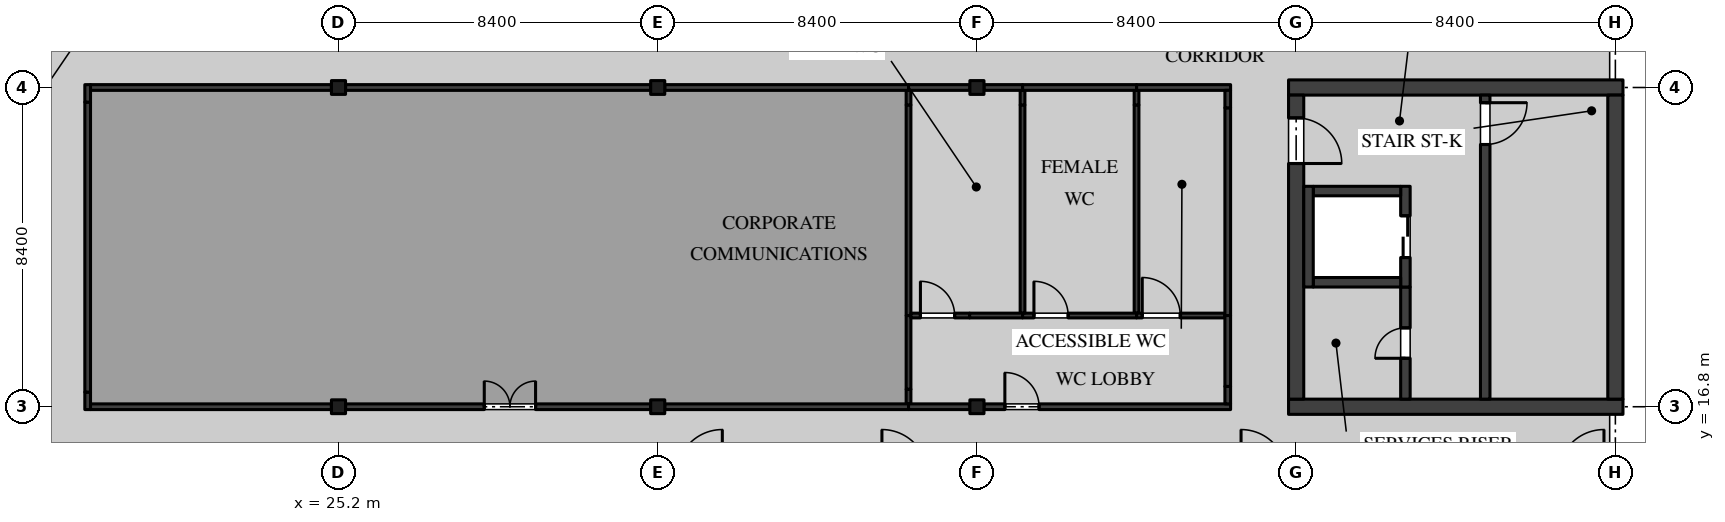
"""IFC4 building model, lengths in metres.
Left out: names, types, materials, properties, quantities, classifications, styles, units other than length and angle.
Written with IfcOpenShell. Run it as: python <this file> out.ifc"""

import sys

from ifc_helpers import new_model, si_unit, direction, frame, frame_2d, origin, origin_2d, place, context, subcontext, project, spatial, rectangle, i_section, extrude, element, fill, save


model = new_model("IFC4")
c1 = context("Model", 3, precision=1e-05, world=origin(), true_north=direction((0.0, 1.0)))
c2 = subcontext(c1, "Body", "Model", "MODEL_VIEW")
j1 = project(units=[si_unit("LENGTHUNIT", "METRE"), si_unit("PLANEANGLEUNIT", "RADIAN")], contexts=[c1])
p1 = place(None, origin())
s1 = spatial("IfcSite", under=j1, at=p1, CompositionType="ELEMENT")
p2 = place(p1, origin())
s2 = spatial("IfcBuilding", under=s1, at=p2, CompositionType="ELEMENT")
p3 = place(p2, frame((0.0, 0.0, 9.9)))
s3 = spatial("IfcBuildingStorey", under=s2, at=p3, CompositionType="ELEMENT", Elevation=9.9)
for number, where, z_axis, x_axis in (
    (1, (25.2, 16.8, 0.0), (0.0, 0.0, 1.0), (1.0, 0.0, 0.0)),
    (2, (25.2, 25.2, 0.0), (0.0, 0.0, 1.0), (1.0, 0.0, 0.0)),
    (3, (33.6, 16.8, 0.0), (0.0, 0.0, 1.0), (1.0, 0.0, 0.0)),
    (4, (33.6, 25.2, 0.0), (0.0, 0.0, 1.0), (1.0, 0.0, 0.0)),
    (5, (42.0, 16.8, 0.0), (0.0, 0.0, 1.0), (1.0, 0.0, 0.0)),
    (6, (42.0, 25.2, 0.0), (0.0, 0.0, 1.0), (1.0, 0.0, 0.0)),
):
    element("IfcColumn", number, at=place(p3, frame(where, z_axis=z_axis, x_axis=x_axis)), inside=s3, PredefinedType="COLUMN", context=c2, shape_type="SweptSolid", body=[
        extrude(i_section(OverallWidth=0.371, OverallDepth=0.363, WebThickness=0.013, FlangeThickness=0.022, FilletRadius=0.015, at=origin_2d()), origin(), (0.0, 0.0, 1.0), 4.37),
    ])
for number, where, z_axis, x_axis in (
    (7, (50.2, 16.8, 0.0), (0.0, 0.0, 1.0), (1.0, 0.0, 0.0)),
    (8, (50.2, 25.2, 0.0), (0.0, 0.0, 1.0), (1.0, 0.0, 0.0)),
):
    element("IfcWall", number, at=place(p3, frame(where, z_axis=z_axis, x_axis=x_axis)), inside=s3, PredefinedType="SHEAR", context=c2, shape_type="SweptSolid", body=[
        extrude(rectangle(XDim=8.8, YDim=0.4, at=frame_2d((4.4, 0.0))), origin(), (0.0, 0.0, 1.0), 4.37),
    ])
p4 = place(p3, frame((50.4, 17.0, 0.0), z_axis=(0.0, 0.0, 1.0), x_axis=(0.0, 1.0, 0.0)))
e9 = element("IfcWall", 9, at=p4, inside=s3, PredefinedType="SHEAR", context=c2, shape_type="SweptSolid", body=[
    extrude(rectangle(XDim=8.0, YDim=0.4, at=frame_2d((4.0, 0.0))), origin(), (0.0, 0.0, 1.0), 4.37),
])
p5 = place(p4, frame((6.2, 0.0, 0.0)))
e10 = element("IfcOpeningElement", 10, at=p5, cuts=e9, PredefinedType="OPENING", context=c2, shape_type="SweptSolid", body=[
    extrude(rectangle(XDim=1.2, YDim=2.1, at=frame_2d((0.6, 1.05))), frame((0.0, 0.21, 0.0), z_axis=(0.0, -1.0, 0.0), x_axis=(1.0, 0.0, 0.0)), (0.0, 0.0, 1.0), 0.42),
])
p6 = place(p3, frame((58.8, 17.0, 0.0), z_axis=(0.0, 0.0, 1.0), x_axis=(0.0, 1.0, 0.0)))
e11 = element("IfcWall", 11, at=p6, inside=s3, PredefinedType="SHEAR", context=c2, shape_type="SweptSolid", body=[
    extrude(rectangle(XDim=8.0, YDim=0.4, at=frame_2d((4.0, 0.0))), origin(), (0.0, 0.0, 1.0), 4.37),
])
p7 = place(p3, frame((55.375, 25.0, 0.0), z_axis=(0.0, 0.0, 1.0), x_axis=(0.0, -1.0, 0.0)))
e12 = element("IfcWall", 12, at=p7, inside=s3, PredefinedType="SOLIDWALL", context=c2, shape_type="SweptSolid", body=[
    extrude(rectangle(XDim=8.0, YDim=0.25, at=frame_2d((4.0, 0.0))), origin(), (0.0, 0.0, 1.0), 4.37),
])
p8 = place(p7, frame((0.2, 0.0, 0.0)))
e13 = element("IfcOpeningElement", 13, at=p8, cuts=e12, PredefinedType="OPENING", context=c2, shape_type="SweptSolid", body=[
    extrude(rectangle(XDim=1.1, YDim=2.1, at=frame_2d((0.55, 1.05))), frame((0.0, 0.135, 0.0), z_axis=(0.0, -1.0, 0.0), x_axis=(1.0, 0.0, 0.0)), (0.0, 0.0, 1.0), 0.27),
])
p9 = place(p3, frame((53.275, 19.95, 0.0), z_axis=(0.0, 0.0, 1.0), x_axis=(0.0, -1.0, 0.0)))
e14 = element("IfcWall", 14, at=p9, inside=s3, PredefinedType="SOLIDWALL", context=c2, shape_type="SweptSolid", body=[
    extrude(rectangle(XDim=2.95, YDim=0.25, at=frame_2d((1.475, 0.0))), origin(), (0.0, 0.0, 1.0), 4.37),
])
p10 = place(p9, frame((1.075, 0.0, 0.0)))
e15 = element("IfcOpeningElement", 15, at=p10, cuts=e14, PredefinedType="OPENING", context=c2, shape_type="SweptSolid", body=[
    extrude(rectangle(XDim=0.8, YDim=2.1, at=frame_2d((0.4, 1.05))), frame((0.0, 0.135, 0.0), z_axis=(0.0, -1.0, 0.0), x_axis=(1.0, 0.0, 0.0)), (0.0, 0.0, 1.0), 0.27),
])
p11 = place(p3, frame((53.275, 19.95, 0.0), z_axis=(0.0, 0.0, 1.0), x_axis=(0.0, 1.0, 0.0)))
e16 = element("IfcWall", 16, at=p11, inside=s3, PredefinedType="SOLIDWALL", context=c2, shape_type="SweptSolid", body=[
    extrude(rectangle(XDim=2.65, YDim=0.25, at=frame_2d((1.325, 0.0))), origin(), (0.0, 0.0, 1.0), 4.37),
])
p12 = place(p11, frame((0.775, 0.0, 0.0)))
e17 = element("IfcOpeningElement", 17, at=p12, cuts=e16, PredefinedType="OPENING", context=c2, shape_type="SweptSolid", body=[
    extrude(rectangle(XDim=1.1, YDim=2.1, at=frame_2d((0.55, 1.05))), frame((0.0, 0.135, 0.0), z_axis=(0.0, -1.0, 0.0), x_axis=(1.0, 0.0, 0.0)), (0.0, 0.0, 1.0), 0.27),
])
for number, where, z_axis, x_axis in (
    (18, (50.85, 22.475, 0.0), (0.0, 0.0, 1.0), (1.0, 0.0, 0.0)),
    (19, (50.85, 20.075, 0.0), (0.0, 0.0, 1.0), (1.0, 0.0, 0.0)),
):
    element("IfcWall", number, at=place(p3, frame(where, z_axis=z_axis, x_axis=x_axis)), inside=s3, PredefinedType="SOLIDWALL", context=c2, shape_type="SweptSolid", body=[
        extrude(rectangle(XDim=2.3, YDim=0.25, at=frame_2d((1.15, 0.0))), origin(), (0.0, 0.0, 1.0), 4.37),
    ])
p13 = place(p3, frame((50.725, 19.95, 0.0), z_axis=(0.0, 0.0, 1.0), x_axis=(0.0, 1.0, 0.0)))
e20 = element("IfcWall", 20, at=p13, inside=s3, PredefinedType="SOLIDWALL", context=c2, shape_type="SweptSolid", body=[
    extrude(rectangle(XDim=2.65, YDim=0.25, at=frame_2d((1.325, 0.0))), origin(), (0.0, 0.0, 1.0), 4.37),
])
p14 = place(p3, frame((40.2, 16.875, 0.0), z_axis=(0.0, 0.0, 1.0), x_axis=(0.0, 1.0, 0.0)))
e21 = element("IfcWall", 21, at=p14, inside=s3, PredefinedType="PARTITIONING", context=c2, shape_type="SweptSolid", body=[
    extrude(rectangle(XDim=0.385, YDim=0.125, at=frame_2d((0.192, 0.0))), origin(), (0.0, 0.0, 1.0), 3.746),
])
p15 = place(p3, frame((40.2, 17.26, 0.0), z_axis=(0.0, 0.0, 1.0), x_axis=(0.0, 1.0, 0.0)))
e22 = element("IfcWall", 22, at=p15, inside=s3, PredefinedType="PARTITIONING", context=c2, shape_type="SweptSolid", body=[
    extrude(rectangle(XDim=1.94, YDim=0.125, at=frame_2d((0.97, 0.0))), origin(), (0.0, 0.0, 1.0), 4.37),
])
p16 = place(p3, frame((40.2, 19.2, 0.0), z_axis=(0.0, 0.0, 1.0), x_axis=(0.0, 1.0, 0.0)))
e23 = element("IfcWall", 23, at=p16, inside=s3, PredefinedType="PARTITIONING", context=c2, shape_type="SweptSolid", body=[
    extrude(rectangle(XDim=5.54, YDim=0.125, at=frame_2d((2.77, 0.0))), origin(), (0.0, 0.0, 1.0), 4.37),
])
p17 = place(p3, frame((40.2, 24.74, 0.0), z_axis=(0.0, 0.0, 1.0), x_axis=(0.0, 1.0, 0.0)))
e24 = element("IfcWall", 24, at=p17, inside=s3, PredefinedType="PARTITIONING", context=c2, shape_type="SweptSolid", body=[
    extrude(rectangle(XDim=0.385, YDim=0.125, at=frame_2d((0.192, 0.0))), origin(), (0.0, 0.0, 1.0), 3.746),
])
p18 = place(p3, frame((18.6, 16.725, 0.0), z_axis=(0.0, 0.0, 1.0), x_axis=(0.0, 1.0, 0.0)))
e25 = element("IfcWall", 25, at=p18, inside=s3, PredefinedType="PARTITIONING", context=c2, shape_type="SweptSolid", body=[
    extrude(rectangle(XDim=0.46, YDim=0.15, at=frame_2d((0.23, 0.0))), origin(), (0.0, 0.0, 1.0), 3.746),
])
p19 = place(p3, frame((18.6, 17.185, 0.0), z_axis=(0.0, 0.0, 1.0), x_axis=(0.0, 1.0, 0.0)))
e26 = element("IfcWall", 26, at=p19, inside=s3, PredefinedType="PARTITIONING", context=c2, shape_type="SweptSolid", body=[
    extrude(rectangle(XDim=7.63, YDim=0.15, at=frame_2d((3.815, 0.0))), origin(), (0.0, 0.0, 1.0), 4.37),
])
p20 = place(p3, frame((18.6, 24.815, 0.0), z_axis=(0.0, 0.0, 1.0), x_axis=(0.0, 1.0, 0.0)))
e27 = element("IfcWall", 27, at=p20, inside=s3, PredefinedType="PARTITIONING", context=c2, shape_type="SweptSolid", body=[
    extrude(rectangle(XDim=0.46, YDim=0.15, at=frame_2d((0.23, 0.0))), origin(), (0.0, 0.0, 1.0), 3.746),
])
p21 = place(p3, frame((18.675, 16.8, 0.0), z_axis=(0.0, 0.0, 1.0), x_axis=(1.0, 0.0, 0.0)))
e28 = element("IfcWall", 28, at=p21, inside=s3, PredefinedType="PARTITIONING", context=c2, shape_type="SweptSolid", body=[
    extrude(rectangle(XDim=6.339, YDim=0.15, at=frame_2d((3.169, 0.0))), origin(), (0.0, 0.0, 1.0), 3.746),
])
p22 = place(p3, frame((25.386, 16.8, 0.0), z_axis=(0.0, 0.0, 1.0), x_axis=(1.0, 0.0, 0.0)))
e29 = element("IfcWall", 29, at=p22, inside=s3, PredefinedType="PARTITIONING", context=c2, shape_type="SweptSolid", body=[
    extrude(rectangle(XDim=8.029, YDim=0.15, at=frame_2d((4.015, 0.0))), origin(), (0.0, 0.0, 1.0), 3.746),
])
p23 = place(p22, frame((3.65, 0.0, 0.0)))
e30 = element("IfcOpeningElement", 30, at=p23, cuts=e29, PredefinedType="OPENING", context=c2, shape_type="SweptSolid", body=[
    extrude(rectangle(XDim=1.35, YDim=2.1, at=frame_2d((0.675, 1.05))), frame((0.0, 0.085, 0.0), z_axis=(0.0, -1.0, 0.0), x_axis=(1.0, 0.0, 0.0)), (0.0, 0.0, 1.0), 0.17),
])
p24 = place(p3, frame((33.785, 16.8, 0.0), z_axis=(0.0, 0.0, 1.0), x_axis=(1.0, 0.0, 0.0)))
e31 = element("IfcWall", 31, at=p24, inside=s3, PredefinedType="PARTITIONING", context=c2, shape_type="SweptSolid", body=[
    extrude(rectangle(XDim=6.415, YDim=0.15, at=frame_2d((3.208, 0.0))), origin(), (0.0, 0.0, 1.0), 3.746),
])
p25 = place(p3, frame((18.675, 25.2, 0.0), z_axis=(0.0, 0.0, 1.0), x_axis=(1.0, 0.0, 0.0)))
e32 = element("IfcWall", 32, at=p25, inside=s3, PredefinedType="PARTITIONING", context=c2, shape_type="SweptSolid", body=[
    extrude(rectangle(XDim=6.339, YDim=0.15, at=frame_2d((3.169, 0.0))), origin(), (0.0, 0.0, 1.0), 3.746),
])
p26 = place(p3, frame((25.386, 25.2, 0.0), z_axis=(0.0, 0.0, 1.0), x_axis=(1.0, 0.0, 0.0)))
e33 = element("IfcWall", 33, at=p26, inside=s3, PredefinedType="PARTITIONING", context=c2, shape_type="SweptSolid", body=[
    extrude(rectangle(XDim=8.029, YDim=0.15, at=frame_2d((4.015, 0.0))), origin(), (0.0, 0.0, 1.0), 3.746),
])
p27 = place(p3, frame((33.785, 25.2, 0.0), z_axis=(0.0, 0.0, 1.0), x_axis=(1.0, 0.0, 0.0)))
e34 = element("IfcWall", 34, at=p27, inside=s3, PredefinedType="PARTITIONING", context=c2, shape_type="SweptSolid", body=[
    extrude(rectangle(XDim=6.415, YDim=0.15, at=frame_2d((3.208, 0.0))), origin(), (0.0, 0.0, 1.0), 3.746),
])
p28 = place(p3, frame((46.2, 19.262, 0.0), z_axis=(0.0, 0.0, 1.0), x_axis=(0.0, 1.0, 0.0)))
e35 = element("IfcWall", 35, at=p28, inside=s3, PredefinedType="PARTITIONING", context=c2, shape_type="SweptSolid", body=[
    extrude(rectangle(XDim=5.478, YDim=0.125, at=frame_2d((2.739, 0.0))), origin(), (0.0, 0.0, 1.0), 4.37),
])
p29 = place(p3, frame((46.2, 24.74, 0.0), z_axis=(0.0, 0.0, 1.0), x_axis=(0.0, 1.0, 0.0)))
e36 = element("IfcWall", 36, at=p29, inside=s3, PredefinedType="PARTITIONING", context=c2, shape_type="SweptSolid", body=[
    extrude(rectangle(XDim=0.385, YDim=0.125, at=frame_2d((0.192, 0.0))), origin(), (0.0, 0.0, 1.0), 3.746),
])
p30 = place(p3, frame((46.2, 19.2, 0.0), z_axis=(0.0, 0.0, 1.0), x_axis=(1.0, 0.0, 0.0)))
e37 = element("IfcWall", 37, at=p30, inside=s3, PredefinedType="PARTITIONING", context=c2, shape_type="SweptSolid", body=[
    extrude(rectangle(XDim=2.325, YDim=0.125, at=frame_2d((1.163, 0.0))), origin(), (0.0, 0.0, 1.0), 3.895),
])
p31 = place(p30, frame((0.15, 0.0, 0.0)))
e38 = element("IfcOpeningElement", 38, at=p31, cuts=e37, PredefinedType="OPENING", context=c2, shape_type="SweptSolid", body=[
    extrude(rectangle(XDim=1.0, YDim=2.1, at=frame_2d((0.5, 1.05))), frame((0.0, 0.073, 0.0), z_axis=(0.0, -1.0, 0.0), x_axis=(1.0, 0.0, 0.0)), (0.0, 0.0, 1.0), 0.145),
])
p32 = place(p3, frame((46.2, 25.2, 0.0), z_axis=(0.0, 0.0, 1.0), x_axis=(1.0, 0.0, 0.0)))
e39 = element("IfcWall", 39, at=p32, inside=s3, PredefinedType="PARTITIONING", context=c2, shape_type="SweptSolid", body=[
    extrude(rectangle(XDim=2.475, YDim=0.15, at=frame_2d((1.238, 0.0))), origin(), (0.0, 0.0, 1.0), 3.746),
])
p33 = place(p3, frame((48.6, 19.2, 0.0), z_axis=(0.0, 0.0, 1.0), x_axis=(0.0, 1.0, 0.0)))
e40 = element("IfcWall", 40, at=p33, inside=s3, PredefinedType="PARTITIONING", context=c2, shape_type="SweptSolid", body=[
    extrude(rectangle(XDim=5.465, YDim=0.15, at=frame_2d((2.732, 0.0))), origin(), (0.0, 0.0, 1.0), 4.37),
])
p34 = place(p3, frame((48.6, 24.665, 0.0), z_axis=(0.0, 0.0, 1.0), x_axis=(0.0, 1.0, 0.0)))
e41 = element("IfcWall", 41, at=p34, inside=s3, PredefinedType="PARTITIONING", context=c2, shape_type="SweptSolid", body=[
    extrude(rectangle(XDim=0.46, YDim=0.15, at=frame_2d((0.23, 0.0))), origin(), (0.0, 0.0, 1.0), 3.746),
])
p35 = place(p3, frame((43.2, 19.2, 0.0), z_axis=(0.0, 0.0, 1.0), x_axis=(1.0, 0.0, 0.0)))
e42 = element("IfcWall", 42, at=p35, inside=s3, PredefinedType="PARTITIONING", context=c2, shape_type="SweptSolid", body=[
    extrude(rectangle(XDim=3.0, YDim=0.125, at=frame_2d((1.5, 0.0))), origin(), (0.0, 0.0, 1.0), 3.895),
])
p36 = place(p35, frame((0.3, 0.0, 0.0)))
e43 = element("IfcOpeningElement", 43, at=p36, cuts=e42, PredefinedType="OPENING", context=c2, shape_type="SweptSolid", body=[
    extrude(rectangle(XDim=0.9, YDim=2.1, at=frame_2d((0.45, 1.05))), frame((0.0, 0.073, 0.0), z_axis=(0.0, -1.0, 0.0), x_axis=(1.0, 0.0, 0.0)), (0.0, 0.0, 1.0), 0.145),
])
p37 = place(p3, frame((43.2, 19.262, 0.0), z_axis=(0.0, 0.0, 1.0), x_axis=(0.0, 1.0, 0.0)))
e44 = element("IfcWall", 44, at=p37, inside=s3, PredefinedType="PARTITIONING", context=c2, shape_type="SweptSolid", body=[
    extrude(rectangle(XDim=5.478, YDim=0.125, at=frame_2d((2.739, 0.0))), origin(), (0.0, 0.0, 1.0), 4.37),
])
p38 = place(p3, frame((43.2, 24.74, 0.0), z_axis=(0.0, 0.0, 1.0), x_axis=(0.0, 1.0, 0.0)))
e45 = element("IfcWall", 45, at=p38, inside=s3, PredefinedType="PARTITIONING", context=c2, shape_type="SweptSolid", body=[
    extrude(rectangle(XDim=0.385, YDim=0.125, at=frame_2d((0.192, 0.0))), origin(), (0.0, 0.0, 1.0), 3.746),
])
p39 = place(p3, frame((43.2, 25.2, 0.0), z_axis=(0.0, 0.0, 1.0), x_axis=(1.0, 0.0, 0.0)))
e46 = element("IfcWall", 46, at=p39, inside=s3, PredefinedType="PARTITIONING", context=c2, shape_type="SweptSolid", body=[
    extrude(rectangle(XDim=3.0, YDim=0.15, at=frame_2d((1.5, 0.0))), origin(), (0.0, 0.0, 1.0), 3.746),
])
p40 = place(p3, frame((40.263, 19.2, 0.0), z_axis=(0.0, 0.0, 1.0), x_axis=(1.0, 0.0, 0.0)))
e47 = element("IfcWall", 47, at=p40, inside=s3, PredefinedType="PARTITIONING", context=c2, shape_type="SweptSolid", body=[
    extrude(rectangle(XDim=1.544, YDim=0.125, at=frame_2d((0.772, 0.0))), origin(), (0.0, 0.0, 1.0), 4.37),
])
p41 = place(p40, frame((0.25, 0.0, 0.0)))
e48 = element("IfcOpeningElement", 48, at=p41, cuts=e47, PredefinedType="OPENING", context=c2, shape_type="SweptSolid", body=[
    extrude(rectangle(XDim=0.9, YDim=2.1, at=frame_2d((0.45, 1.05))), frame((0.0, 0.073, 0.0), z_axis=(0.0, -1.0, 0.0), x_axis=(1.0, 0.0, 0.0)), (0.0, 0.0, 1.0), 0.145),
])
p42 = place(p3, frame((41.807, 19.2, 0.0), z_axis=(0.0, 0.0, 1.0), x_axis=(1.0, 0.0, 0.0)))
e49 = element("IfcWall", 49, at=p42, inside=s3, PredefinedType="PARTITIONING", context=c2, shape_type="SweptSolid", body=[
    extrude(rectangle(XDim=1.393, YDim=0.125, at=frame_2d((0.697, 0.0))), origin(), (0.0, 0.0, 1.0), 3.746),
])
p43 = place(p3, frame((40.2, 16.8, 0.0), z_axis=(0.0, 0.0, 1.0), x_axis=(1.0, 0.0, 0.0)))
e50 = element("IfcWall", 50, at=p43, inside=s3, PredefinedType="PARTITIONING", context=c2, shape_type="SweptSolid", body=[
    extrude(rectangle(XDim=1.615, YDim=0.15, at=frame_2d((0.808, 0.0))), origin(), (0.0, 0.0, 1.0), 3.746),
])
p44 = place(p3, frame((42.185, 16.8, 0.0), z_axis=(0.0, 0.0, 1.0), x_axis=(1.0, 0.0, 0.0)))
e51 = element("IfcWall", 51, at=p44, inside=s3, PredefinedType="PARTITIONING", context=c2, shape_type="SweptSolid", body=[
    extrude(rectangle(XDim=6.49, YDim=0.15, at=frame_2d((3.245, 0.0))), origin(), (0.0, 0.0, 1.0), 3.746),
])
p45 = place(p44, frame((0.55, 0.0, 0.0)))
e52 = element("IfcOpeningElement", 52, at=p45, cuts=e51, PredefinedType="OPENING", context=c2, shape_type="SweptSolid", body=[
    extrude(rectangle(XDim=0.9, YDim=2.1, at=frame_2d((0.45, 1.05))), frame((0.0, 0.085, 0.0), z_axis=(0.0, -1.0, 0.0), x_axis=(1.0, 0.0, 0.0)), (0.0, 0.0, 1.0), 0.17),
])
p46 = place(p3, frame((48.6, 16.875, 0.0), z_axis=(0.0, 0.0, 1.0), x_axis=(0.0, 1.0, 0.0)))
e53 = element("IfcWall", 53, at=p46, inside=s3, PredefinedType="PARTITIONING", context=c2, shape_type="SweptSolid", body=[
    extrude(rectangle(XDim=0.46, YDim=0.15, at=frame_2d((0.23, 0.0))), origin(), (0.0, 0.0, 1.0), 3.746),
])
p47 = place(p3, frame((48.6, 17.335, 0.0), z_axis=(0.0, 0.0, 1.0), x_axis=(0.0, 1.0, 0.0)))
e54 = element("IfcWall", 54, at=p47, inside=s3, PredefinedType="PARTITIONING", context=c2, shape_type="SweptSolid", body=[
    extrude(rectangle(XDim=1.865, YDim=0.15, at=frame_2d((0.933, 0.0))), origin(), (0.0, 0.0, 1.0), 4.37),
])
p48 = place(p3, frame((40.2, 25.2, 0.0), z_axis=(0.0, 0.0, 1.0), x_axis=(1.0, 0.0, 0.0)))
e55 = element("IfcWall", 55, at=p48, inside=s3, PredefinedType="PARTITIONING", context=c2, shape_type="SweptSolid", body=[
    extrude(rectangle(XDim=1.615, YDim=0.15, at=frame_2d((0.808, 0.0))), origin(), (0.0, 0.0, 1.0), 3.746),
])
p49 = place(p3, frame((42.185, 25.2, 0.0), z_axis=(0.0, 0.0, 1.0), x_axis=(1.0, 0.0, 0.0)))
e56 = element("IfcWall", 56, at=p49, inside=s3, PredefinedType="PARTITIONING", context=c2, shape_type="SweptSolid", body=[
    extrude(rectangle(XDim=1.015, YDim=0.15, at=frame_2d((0.507, 0.0))), origin(), (0.0, 0.0, 1.0), 3.746),
])
p50 = place(p5, frame((1.2, 0.0, 0.0), z_axis=(0.0, 0.0, 1.0), x_axis=(-1.0, 0.0, 0.0)))
e57 = element("IfcDoor", 57, at=p50, inside=s3, OperationType="SINGLE_SWING_LEFT", PredefinedType="DOOR", context=c2, shape_type="SweptSolid", body=[
    extrude(rectangle(XDim=1.2, YDim=2.1, at=frame_2d((0.6, 1.05))), frame((0.0, 0.035, 0.0), z_axis=(0.0, -1.0, 0.0), x_axis=(1.0, 0.0, 0.0)), (0.0, 0.0, 1.0), 0.07),
])
fill(e10, e57)
p51 = place(p10, frame((0.8, 0.0, 0.0), z_axis=(0.0, 0.0, 1.0), x_axis=(-1.0, 0.0, 0.0)))
e58 = element("IfcDoor", 58, at=p51, inside=s3, OperationType="SINGLE_SWING_RIGHT", PredefinedType="DOOR", context=c2, shape_type="SweptSolid", body=[
    extrude(rectangle(XDim=0.8, YDim=2.1, at=frame_2d((0.4, 1.05))), frame((0.0, 0.035, 0.0), z_axis=(0.0, -1.0, 0.0), x_axis=(1.0, 0.0, 0.0)), (0.0, 0.0, 1.0), 0.07),
])
fill(e15, e58)
p52 = place(p8, origin())
e59 = element("IfcDoor", 59, at=p52, inside=s3, OperationType="SINGLE_SWING_RIGHT", PredefinedType="DOOR", context=c2, shape_type="SweptSolid", body=[
    extrude(rectangle(XDim=1.1, YDim=2.1, at=frame_2d((0.55, 1.05))), frame((0.0, 0.035, 0.0), z_axis=(0.0, -1.0, 0.0), x_axis=(1.0, 0.0, 0.0)), (0.0, 0.0, 1.0), 0.07),
])
fill(e13, e59)
p53 = place(p12, origin())
e60 = element("IfcDoor", 60, at=p53, inside=s3, OperationType="DOUBLE_DOOR_SLIDING", PredefinedType="DOOR", context=c2, shape_type="SweptSolid", body=[
    extrude(rectangle(XDim=1.1, YDim=2.1, at=frame_2d((0.55, 1.05))), frame((0.0, 0.04, 0.0), z_axis=(0.0, -1.0, 0.0), x_axis=(1.0, 0.0, 0.0)), (0.0, 0.0, 1.0), 0.08),
])
fill(e17, e60)
p54 = place(p23, origin())
e61 = element("IfcDoor", 61, at=p54, inside=s3, OperationType="DOUBLE_DOOR_SINGLE_SWING", PredefinedType="DOOR", context=c2, shape_type="SweptSolid", body=[
    extrude(rectangle(XDim=1.35, YDim=2.1, at=frame_2d((0.675, 1.05))), frame((0.0, 0.025, 0.0), z_axis=(0.0, -1.0, 0.0), x_axis=(1.0, 0.0, 0.0)), (0.0, 0.0, 1.0), 0.05),
])
fill(e30, e61)
p55 = place(p31, origin())
e62 = element("IfcDoor", 62, at=p55, inside=s3, OperationType="SINGLE_SWING_RIGHT", PredefinedType="DOOR", context=c2, shape_type="SweptSolid", body=[
    extrude(rectangle(XDim=1.0, YDim=2.1, at=frame_2d((0.5, 1.05))), frame((0.0, 0.02, 0.0), z_axis=(0.0, -1.0, 0.0), x_axis=(1.0, 0.0, 0.0)), (0.0, 0.0, 1.0), 0.04),
])
fill(e38, e62)
p56 = place(p36, origin())
e63 = element("IfcDoor", 63, at=p56, inside=s3, OperationType="SINGLE_SWING_RIGHT", PredefinedType="DOOR", context=c2, shape_type="SweptSolid", body=[
    extrude(rectangle(XDim=0.9, YDim=2.1, at=frame_2d((0.45, 1.05))), frame((0.0, 0.02, 0.0), z_axis=(0.0, -1.0, 0.0), x_axis=(1.0, 0.0, 0.0)), (0.0, 0.0, 1.0), 0.04),
])
fill(e43, e63)
p57 = place(p45, origin())
e64 = element("IfcDoor", 64, at=p57, inside=s3, OperationType="SINGLE_SWING_RIGHT", PredefinedType="DOOR", context=c2, shape_type="SweptSolid", body=[
    extrude(rectangle(XDim=0.9, YDim=2.1, at=frame_2d((0.45, 1.05))), frame((0.0, 0.025, 0.0), z_axis=(0.0, -1.0, 0.0), x_axis=(1.0, 0.0, 0.0)), (0.0, 0.0, 1.0), 0.05),
])
fill(e52, e64)
p58 = place(p41, origin())
e65 = element("IfcDoor", 65, at=p58, inside=s3, OperationType="SINGLE_SWING_RIGHT", PredefinedType="DOOR", context=c2, shape_type="SweptSolid", body=[
    extrude(rectangle(XDim=0.9, YDim=2.1, at=frame_2d((0.45, 1.05))), frame((0.0, 0.02, 0.0), z_axis=(0.0, -1.0, 0.0), x_axis=(1.0, 0.0, 0.0)), (0.0, 0.0, 1.0), 0.04),
])
fill(e48, e65)
save(model, sys.argv[1])
